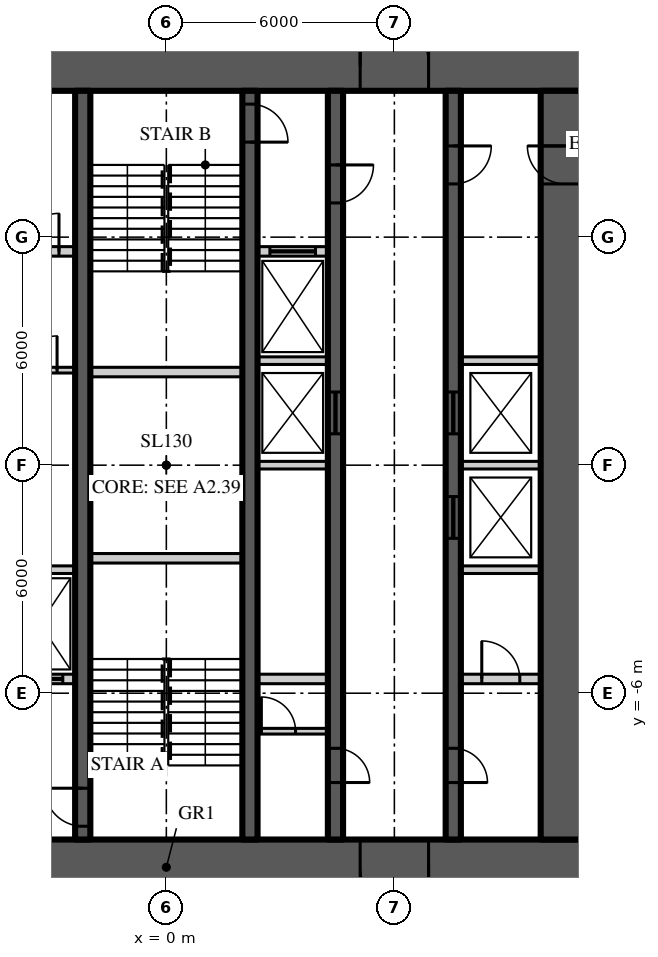
"""IFC4 building model, lengths in metres.
Left out: names, types, materials, properties, quantities, classifications, styles, units other than length and angle.
Written with IfcOpenShell. Run it as: python <this file> out.ifc"""

import sys

from ifc_helpers import new_model, si_unit, direction, frame, frame_2d, origin, place, context, subcontext, project, spatial, rectangle, extrude, element, fill, save


model = new_model("IFC4")
c1 = context("Model", 3, precision=1e-05, world=origin(), true_north=direction((0.0, 1.0)))
c2 = subcontext(c1, "Body", "Model", "MODEL_VIEW")
j1 = project(units=[si_unit("LENGTHUNIT", "METRE"), si_unit("PLANEANGLEUNIT", "RADIAN")], contexts=[c1])
p1 = place(None, origin())
s1 = spatial("IfcSite", under=j1, at=p1, CompositionType="ELEMENT")
p2 = place(p1, origin())
s2 = spatial("IfcBuilding", under=s1, at=p2, CompositionType="ELEMENT")
p3 = place(p2, frame((0.0, 0.0, 302.4)))
s3 = spatial("IfcBuildingStorey", under=s2, at=p3, CompositionType="ELEMENT", Elevation=302.4)
p4 = place(p3, frame((-11.15, 10.5, 0.0), z_axis=(0.0, 0.0, 1.0), x_axis=(1.0, 0.0, 0.0)))
e1 = element("IfcWall", 1, at=p4, inside=s3, PredefinedType="SHEAR", context=c2, shape_type="SweptSolid", body=[
    extrude(rectangle(XDim=22.3, YDim=1.3, at=frame_2d((11.15, 0.0))), origin(), (0.0, 0.0, 1.0), 3.9),
])
p5 = place(p4, frame((4.25, 0.0, 0.0)))
e2 = element("IfcOpeningElement", 2, at=p5, cuts=e1, PredefinedType="OPENING", context=c2, shape_type="SweptSolid", body=[
    extrude(rectangle(XDim=1.8, YDim=2.2, at=frame_2d((0.9, 1.1))), frame((0.0, 0.66, 0.0), z_axis=(0.0, -1.0, 0.0), x_axis=(1.0, 0.0, 0.0)), (0.0, 0.0, 1.0), 1.32),
])
p6 = place(p4, frame((16.25, 0.0, 0.0)))
e3 = element("IfcOpeningElement", 3, at=p6, cuts=e1, PredefinedType="OPENING", context=c2, shape_type="SweptSolid", body=[
    extrude(rectangle(XDim=1.8, YDim=2.2, at=frame_2d((0.9, 1.1))), frame((0.0, 0.66, 0.0), z_axis=(0.0, -1.0, 0.0), x_axis=(1.0, 0.0, 0.0)), (0.0, 0.0, 1.0), 1.32),
])
p7 = place(p3, frame((11.15, -10.5, 0.0), z_axis=(0.0, 0.0, 1.0), x_axis=(-1.0, 0.0, 0.0)))
e4 = element("IfcWall", 4, at=p7, inside=s3, PredefinedType="SHEAR", context=c2, shape_type="SweptSolid", body=[
    extrude(rectangle(XDim=22.3, YDim=1.3, at=frame_2d((11.15, 0.0))), origin(), (0.0, 0.0, 1.0), 3.9),
])
p8 = place(p7, frame((16.25, 0.0, 0.0)))
e5 = element("IfcOpeningElement", 5, at=p8, cuts=e4, PredefinedType="OPENING", context=c2, shape_type="SweptSolid", body=[
    extrude(rectangle(XDim=1.8, YDim=2.2, at=frame_2d((0.9, 1.1))), frame((0.0, 0.66, 0.0), z_axis=(0.0, -1.0, 0.0), x_axis=(1.0, 0.0, 0.0)), (0.0, 0.0, 1.0), 1.32),
])
p9 = place(p7, frame((4.25, 0.0, 0.0)))
e6 = element("IfcOpeningElement", 6, at=p9, cuts=e4, PredefinedType="OPENING", context=c2, shape_type="SweptSolid", body=[
    extrude(rectangle(XDim=1.8, YDim=2.2, at=frame_2d((0.9, 1.1))), frame((0.0, 0.66, 0.0), z_axis=(0.0, -1.0, 0.0), x_axis=(1.0, 0.0, 0.0)), (0.0, 0.0, 1.0), 1.32),
])
p10 = place(p3, frame((10.5, -9.85, 0.0), z_axis=(0.0, 0.0, 1.0), x_axis=(0.0, 1.0, 0.0)))
e7 = element("IfcWall", 7, at=p10, inside=s3, PredefinedType="SHEAR", context=c2, shape_type="SweptSolid", body=[
    extrude(rectangle(XDim=19.7, YDim=1.3, at=frame_2d((9.85, 0.0))), origin(), (0.0, 0.0, 1.0), 3.9),
])
p11 = place(p10, frame((17.25, 0.0, 0.0)))
e8 = element("IfcOpeningElement", 8, at=p11, cuts=e7, PredefinedType="OPENING", context=c2, shape_type="SweptSolid", body=[
    extrude(rectangle(XDim=1.0, YDim=2.2, at=frame_2d((0.5, 1.1))), frame((0.0, 0.66, 0.0), z_axis=(0.0, -1.0, 0.0), x_axis=(1.0, 0.0, 0.0)), (0.0, 0.0, 1.0), 1.32),
])
p12 = place(p3, frame((7.55, 9.85, 0.0), z_axis=(0.0, 0.0, 1.0), x_axis=(0.0, -1.0, 0.0)))
e9 = element("IfcWall", 9, at=p12, inside=s3, PredefinedType="SHEAR", context=c2, shape_type="SweptSolid", body=[
    extrude(rectangle(XDim=19.7, YDim=0.4, at=frame_2d((9.85, 0.0))), origin(), (0.0, 0.0, 1.0), 3.9),
])
p13 = place(p12, frame((1.45, 0.0, 0.0)))
e10 = element("IfcOpeningElement", 10, at=p13, cuts=e9, PredefinedType="OPENING", context=c2, shape_type="SweptSolid", body=[
    extrude(rectangle(XDim=1.0, YDim=2.2, at=frame_2d((0.5, 1.1))), frame((0.0, 0.21, 0.0), z_axis=(0.0, -1.0, 0.0), x_axis=(1.0, 0.0, 0.0)), (0.0, 0.0, 1.0), 0.42),
])
p14 = place(p12, frame((17.3, 0.0, 0.0)))
e11 = element("IfcOpeningElement", 11, at=p14, cuts=e9, PredefinedType="OPENING", context=c2, shape_type="SweptSolid", body=[
    extrude(rectangle(XDim=0.9, YDim=2.1, at=frame_2d((0.45, 1.05))), frame((0.0, 0.21, 0.0), z_axis=(0.0, -1.0, 0.0), x_axis=(1.0, 0.0, 0.0)), (0.0, 0.0, 1.0), 0.42),
])
p15 = place(p12, frame((7.925, 0.0, 0.0)))
e12 = element("IfcOpeningElement", 12, at=p15, cuts=e9, PredefinedType="OPENING", context=c2, shape_type="SweptSolid", body=[
    extrude(rectangle(XDim=1.1, YDim=2.2, at=frame_2d((0.55, 1.1))), frame((0.0, 0.21, 0.0), z_axis=(0.0, -1.0, 0.0), x_axis=(1.0, 0.0, 0.0)), (0.0, 0.0, 1.0), 0.42),
])
p16 = place(p12, frame((10.675, 0.0, 0.0)))
e13 = element("IfcOpeningElement", 13, at=p16, cuts=e9, PredefinedType="OPENING", context=c2, shape_type="SweptSolid", body=[
    extrude(rectangle(XDim=1.1, YDim=2.2, at=frame_2d((0.55, 1.1))), frame((0.0, 0.21, 0.0), z_axis=(0.0, -1.0, 0.0), x_axis=(1.0, 0.0, 0.0)), (0.0, 0.0, 1.0), 0.42),
])
p17 = place(p3, frame((4.45, 9.85, 0.0), z_axis=(0.0, 0.0, 1.0), x_axis=(0.0, -1.0, 0.0)))
e14 = element("IfcWall", 14, at=p17, inside=s3, PredefinedType="SHEAR", context=c2, shape_type="SweptSolid", body=[
    extrude(rectangle(XDim=19.7, YDim=0.4, at=frame_2d((9.85, 0.0))), origin(), (0.0, 0.0, 1.0), 3.9),
])
p18 = place(p17, frame((1.95, 0.0, 0.0)))
e15 = element("IfcOpeningElement", 15, at=p18, cuts=e14, PredefinedType="OPENING", context=c2, shape_type="SweptSolid", body=[
    extrude(rectangle(XDim=1.0, YDim=2.2, at=frame_2d((0.5, 1.1))), frame((0.0, 0.21, 0.0), z_axis=(0.0, -1.0, 0.0), x_axis=(1.0, 0.0, 0.0)), (0.0, 0.0, 1.0), 0.42),
])
p19 = place(p17, frame((17.3, 0.0, 0.0)))
e16 = element("IfcOpeningElement", 16, at=p19, cuts=e14, PredefinedType="OPENING", context=c2, shape_type="SweptSolid", body=[
    extrude(rectangle(XDim=0.9, YDim=2.1, at=frame_2d((0.45, 1.05))), frame((0.0, 0.21, 0.0), z_axis=(0.0, -1.0, 0.0), x_axis=(1.0, 0.0, 0.0)), (0.0, 0.0, 1.0), 0.42),
])
p20 = place(p17, frame((7.925, 0.0, 0.0)))
e17 = element("IfcOpeningElement", 17, at=p20, cuts=e14, PredefinedType="OPENING", context=c2, shape_type="SweptSolid", body=[
    extrude(rectangle(XDim=1.1, YDim=2.2, at=frame_2d((0.55, 1.1))), frame((0.0, 0.21, 0.0), z_axis=(0.0, -1.0, 0.0), x_axis=(1.0, 0.0, 0.0)), (0.0, 0.0, 1.0), 0.42),
])
p21 = place(p3, frame((-2.2, -9.85, 0.0), z_axis=(0.0, 0.0, 1.0), x_axis=(0.0, 1.0, 0.0)))
e18 = element("IfcWall", 18, at=p21, inside=s3, PredefinedType="SHEAR", context=c2, shape_type="SweptSolid", body=[
    extrude(rectangle(XDim=19.7, YDim=0.4, at=frame_2d((9.85, 0.0))), origin(), (0.0, 0.0, 1.0), 3.9),
])
p22 = place(p21, frame((0.35, 0.0, 0.0)))
e19 = element("IfcOpeningElement", 19, at=p22, cuts=e18, PredefinedType="OPENING", context=c2, shape_type="SweptSolid", body=[
    extrude(rectangle(XDim=1.0, YDim=2.2, at=frame_2d((0.5, 1.1))), frame((0.0, 0.21, 0.0), z_axis=(0.0, -1.0, 0.0), x_axis=(1.0, 0.0, 0.0)), (0.0, 0.0, 1.0), 0.42),
])
p23 = place(p3, frame((2.2, 9.85, 0.0), z_axis=(0.0, 0.0, 1.0), x_axis=(0.0, -1.0, 0.0)))
e20 = element("IfcWall", 20, at=p23, inside=s3, PredefinedType="SHEAR", context=c2, shape_type="SweptSolid", body=[
    extrude(rectangle(XDim=19.7, YDim=0.4, at=frame_2d((9.85, 0.0))), origin(), (0.0, 0.0, 1.0), 3.9),
])
p24 = place(p23, frame((0.35, 0.0, 0.0)))
e21 = element("IfcOpeningElement", 21, at=p24, cuts=e20, PredefinedType="OPENING", context=c2, shape_type="SweptSolid", body=[
    extrude(rectangle(XDim=1.0, YDim=2.2, at=frame_2d((0.5, 1.1))), frame((0.0, 0.21, 0.0), z_axis=(0.0, -1.0, 0.0), x_axis=(1.0, 0.0, 0.0)), (0.0, 0.0, 1.0), 0.42),
])
p25 = place(p3, frame((-4.25, 5.625, 0.0), z_axis=(0.0, 0.0, 1.0), x_axis=(1.0, 0.0, 0.0)))
e22 = element("IfcWall", 22, at=p25, inside=s3, PredefinedType="SOLIDWALL", context=c2, shape_type="SweptSolid", body=[
    extrude(rectangle(XDim=1.85, YDim=0.25, at=frame_2d((0.925, 0.0))), origin(), (0.0, 0.0, 1.0), 3.7),
])
p26 = place(p25, frame((0.425, 0.0, 0.0)))
e23 = element("IfcOpeningElement", 23, at=p26, cuts=e22, PredefinedType="OPENING", context=c2, shape_type="SweptSolid", body=[
    extrude(rectangle(XDim=1.0, YDim=2.2, at=frame_2d((0.5, 1.1))), frame((0.0, 0.135, 0.0), z_axis=(0.0, -1.0, 0.0), x_axis=(1.0, 0.0, 0.0)), (0.0, 0.0, 1.0), 0.27),
])
p27 = place(p3, frame((2.4, 5.625, 0.0), z_axis=(0.0, 0.0, 1.0), x_axis=(1.0, 0.0, 0.0)))
e24 = element("IfcWall", 24, at=p27, inside=s3, PredefinedType="SOLIDWALL", context=c2, shape_type="SweptSolid", body=[
    extrude(rectangle(XDim=1.85, YDim=0.25, at=frame_2d((0.925, 0.0))), origin(), (0.0, 0.0, 1.0), 3.7),
])
p28 = place(p27, frame((0.325, 0.0, 0.0)))
e25 = element("IfcOpeningElement", 25, at=p28, cuts=e24, PredefinedType="OPENING", context=c2, shape_type="SweptSolid", body=[
    extrude(rectangle(XDim=1.2, YDim=2.2, at=frame_2d((0.6, 1.1))), frame((0.0, 0.135, 0.0), z_axis=(0.0, -1.0, 0.0), x_axis=(1.0, 0.0, 0.0)), (0.0, 0.0, 1.0), 0.27),
])
p29 = place(p3, frame((-4.25, -5.625, 0.0), z_axis=(0.0, 0.0, 1.0), x_axis=(1.0, 0.0, 0.0)))
e26 = element("IfcWall", 26, at=p29, inside=s3, PredefinedType="SOLIDWALL", context=c2, shape_type="SweptSolid", body=[
    extrude(rectangle(XDim=1.85, YDim=0.25, at=frame_2d((0.925, 0.0))), origin(), (0.0, 0.0, 1.0), 3.7),
])
p30 = place(p29, frame((0.325, 0.0, 0.0)))
e27 = element("IfcOpeningElement", 27, at=p30, cuts=e26, PredefinedType="OPENING", context=c2, shape_type="SweptSolid", body=[
    extrude(rectangle(XDim=1.2, YDim=2.2, at=frame_2d((0.6, 1.1))), frame((0.0, 0.135, 0.0), z_axis=(0.0, -1.0, 0.0), x_axis=(1.0, 0.0, 0.0)), (0.0, 0.0, 1.0), 0.27),
])
p31 = place(p3, frame((2.4, -5.625, 0.0), z_axis=(0.0, 0.0, 1.0), x_axis=(1.0, 0.0, 0.0)))
e28 = element("IfcWall", 28, at=p31, inside=s3, PredefinedType="SOLIDWALL", context=c2, shape_type="SweptSolid", body=[
    extrude(rectangle(XDim=1.85, YDim=0.25, at=frame_2d((0.925, 0.0))), origin(), (0.0, 0.0, 1.0), 3.7),
])
p32 = place(p3, frame((7.75, -5.625, 0.0), z_axis=(0.0, 0.0, 1.0), x_axis=(1.0, 0.0, 0.0)))
e29 = element("IfcWall", 29, at=p32, inside=s3, PredefinedType="SOLIDWALL", context=c2, shape_type="SweptSolid", body=[
    extrude(rectangle(XDim=2.1, YDim=0.25, at=frame_2d((1.05, 0.0))), origin(), (0.0, 0.0, 1.0), 3.7),
])
p33 = place(p32, frame((0.55, 0.0, 0.0)))
e30 = element("IfcOpeningElement", 30, at=p33, cuts=e29, PredefinedType="OPENING", context=c2, shape_type="SweptSolid", body=[
    extrude(rectangle(XDim=1.0, YDim=2.2, at=frame_2d((0.5, 1.1))), frame((0.0, 0.135, 0.0), z_axis=(0.0, -1.0, 0.0), x_axis=(1.0, 0.0, 0.0)), (0.0, 0.0, 1.0), 0.27),
])
for number, where, z_axis, x_axis in (
    (31, (-2.0, -2.45, 0.0), (0.0, 0.0, 1.0), (1.0, 0.0, 0.0)),
    (32, (-2.0, 2.45, 0.0), (0.0, 0.0, 1.0), (1.0, 0.0, 0.0)),
):
    element("IfcWall", number, at=place(p3, frame(where, z_axis=z_axis, x_axis=x_axis)), inside=s3, PredefinedType="SOLIDWALL", context=c2, shape_type="SweptSolid", body=[
        extrude(rectangle(XDim=4.0, YDim=0.25, at=frame_2d((2.0, 0.0))), origin(), (0.0, 0.0, 1.0), 3.7),
    ])
p34 = place(p3, frame((-4.25, -2.75, 0.0), z_axis=(0.0, 0.0, 1.0), x_axis=(1.0, 0.0, 0.0)))
e33 = element("IfcWall", 33, at=p34, inside=s3, PredefinedType="SOLIDWALL", context=c2, shape_type="SweptSolid", body=[
    extrude(rectangle(XDim=1.85, YDim=0.2, at=frame_2d((0.925, 0.0))), origin(), (0.0, 0.0, 1.0), 3.7),
])
p35 = place(p3, frame((7.75, -2.75, 0.0), z_axis=(0.0, 0.0, 1.0), x_axis=(1.0, 0.0, 0.0)))
e34 = element("IfcWall", 34, at=p35, inside=s3, PredefinedType="SOLIDWALL", context=c2, shape_type="SweptSolid", body=[
    extrude(rectangle(XDim=2.1, YDim=0.2, at=frame_2d((1.05, 0.0))), origin(), (0.0, 0.0, 1.0), 3.7),
])
p36 = place(p3, frame((2.4, 0.0, 0.0), z_axis=(0.0, 0.0, 1.0), x_axis=(1.0, 0.0, 0.0)))
e35 = element("IfcWall", 35, at=p36, inside=s3, PredefinedType="SOLIDWALL", context=c2, shape_type="SweptSolid", body=[
    extrude(rectangle(XDim=1.85, YDim=0.2, at=frame_2d((0.925, 0.0))), origin(), (0.0, 0.0, 1.0), 3.7),
])
p37 = place(p3, frame((7.75, 0.0, 0.0), z_axis=(0.0, 0.0, 1.0), x_axis=(1.0, 0.0, 0.0)))
e36 = element("IfcWall", 36, at=p37, inside=s3, PredefinedType="SOLIDWALL", context=c2, shape_type="SweptSolid", body=[
    extrude(rectangle(XDim=2.1, YDim=0.2, at=frame_2d((1.05, 0.0))), origin(), (0.0, 0.0, 1.0), 3.7),
])
p38 = place(p3, frame((2.4, 2.75, 0.0), z_axis=(0.0, 0.0, 1.0), x_axis=(1.0, 0.0, 0.0)))
e37 = element("IfcWall", 37, at=p38, inside=s3, PredefinedType="SOLIDWALL", context=c2, shape_type="SweptSolid", body=[
    extrude(rectangle(XDim=1.85, YDim=0.2, at=frame_2d((0.925, 0.0))), origin(), (0.0, 0.0, 1.0), 3.7),
])
p39 = place(p3, frame((7.75, 2.75, 0.0), z_axis=(0.0, 0.0, 1.0), x_axis=(1.0, 0.0, 0.0)))
e38 = element("IfcWall", 38, at=p39, inside=s3, PredefinedType="SOLIDWALL", context=c2, shape_type="SweptSolid", body=[
    extrude(rectangle(XDim=2.1, YDim=0.2, at=frame_2d((1.05, 0.0))), origin(), (0.0, 0.0, 1.0), 3.7),
])
p40 = place(p3, frame((-4.25, 2.5, 0.0), z_axis=(0.0, 0.0, 1.0), x_axis=(1.0, 0.0, 0.0)))
e39 = element("IfcWall", 39, at=p40, inside=s3, PredefinedType="SOLIDWALL", context=c2, shape_type="SweptSolid", body=[
    extrude(rectangle(XDim=1.85, YDim=0.15, at=frame_2d((0.925, 0.0))), origin(), (0.0, 0.0, 1.0), 3.72),
])
p41 = place(p40, frame((0.475, 0.0, 0.0)))
e40 = element("IfcOpeningElement", 40, at=p41, cuts=e39, PredefinedType="OPENING", context=c2, shape_type="SweptSolid", body=[
    extrude(rectangle(XDim=0.9, YDim=2.1, at=frame_2d((0.45, 1.05))), frame((0.0, 0.085, 0.0), z_axis=(0.0, -1.0, 0.0), x_axis=(1.0, 0.0, 0.0)), (0.0, 0.0, 1.0), 0.17),
])
p42 = place(p3, frame((2.4, -7.0, 0.0), z_axis=(0.0, 0.0, 1.0), x_axis=(1.0, 0.0, 0.0)))
e41 = element("IfcWall", 41, at=p42, inside=s3, PredefinedType="SOLIDWALL", context=c2, shape_type="SweptSolid", body=[
    extrude(rectangle(XDim=1.85, YDim=0.15, at=frame_2d((0.925, 0.0))), origin(), (0.0, 0.0, 1.0), 3.72),
])
p43 = place(p42, frame((0.1, 0.0, 0.0)))
e42 = element("IfcOpeningElement", 42, at=p43, cuts=e41, PredefinedType="OPENING", context=c2, shape_type="SweptSolid", body=[
    extrude(rectangle(XDim=0.9, YDim=2.1, at=frame_2d((0.45, 1.05))), frame((0.0, 0.085, 0.0), z_axis=(0.0, -1.0, 0.0), x_axis=(1.0, 0.0, 0.0)), (0.0, 0.0, 1.0), 0.17),
])
p44 = place(p6, origin())
e43 = element("IfcDoor", 43, at=p44, inside=s3, OperationType="DOUBLE_DOOR_DOUBLE_SWING", PredefinedType="DOOR", context=c2, shape_type="SweptSolid", body=[
    extrude(rectangle(XDim=1.8, YDim=2.2, at=frame_2d((0.9, 1.1))), frame((0.0, 0.025, 0.0), z_axis=(0.0, -1.0, 0.0), x_axis=(1.0, 0.0, 0.0)), (0.0, 0.0, 1.0), 0.05),
])
fill(e3, e43)
p45 = place(p9, origin())
e44 = element("IfcDoor", 44, at=p45, inside=s3, OperationType="DOUBLE_DOOR_DOUBLE_SWING", PredefinedType="DOOR", context=c2, shape_type="SweptSolid", body=[
    extrude(rectangle(XDim=1.8, YDim=2.2, at=frame_2d((0.9, 1.1))), frame((0.0, 0.025, 0.0), z_axis=(0.0, -1.0, 0.0), x_axis=(1.0, 0.0, 0.0)), (0.0, 0.0, 1.0), 0.05),
])
fill(e6, e44)
p46 = place(p13, origin())
e45 = element("IfcDoor", 45, at=p46, inside=s3, OperationType="SINGLE_SWING_LEFT", PredefinedType="DOOR", context=c2, shape_type="SweptSolid", body=[
    extrude(rectangle(XDim=1.0, YDim=2.2, at=frame_2d((0.5, 1.1))), frame((0.0, 0.025, 0.0), z_axis=(0.0, -1.0, 0.0), x_axis=(1.0, 0.0, 0.0)), (0.0, 0.0, 1.0), 0.05),
])
fill(e10, e45)
p47 = place(p11, origin())
e46 = element("IfcDoor", 46, at=p47, inside=s3, OperationType="SINGLE_SWING_RIGHT", PredefinedType="DOOR", context=c2, shape_type="SweptSolid", body=[
    extrude(rectangle(XDim=1.0, YDim=2.2, at=frame_2d((0.5, 1.1))), frame((0.0, 0.025, 0.0), z_axis=(0.0, -1.0, 0.0), x_axis=(1.0, 0.0, 0.0)), (0.0, 0.0, 1.0), 0.05),
])
fill(e8, e46)
p48 = place(p22, origin())
e47 = element("IfcDoor", 47, at=p48, inside=s3, OperationType="SINGLE_SWING_RIGHT", PredefinedType="DOOR", context=c2, shape_type="SweptSolid", body=[
    extrude(rectangle(XDim=1.0, YDim=2.2, at=frame_2d((0.5, 1.1))), frame((0.0, 0.025, 0.0), z_axis=(0.0, -1.0, 0.0), x_axis=(1.0, 0.0, 0.0)), (0.0, 0.0, 1.0), 0.05),
])
fill(e19, e47)
p49 = place(p18, origin())
e48 = element("IfcDoor", 48, at=p49, inside=s3, OperationType="SINGLE_SWING_LEFT", PredefinedType="DOOR", context=c2, shape_type="SweptSolid", body=[
    extrude(rectangle(XDim=1.0, YDim=2.2, at=frame_2d((0.5, 1.1))), frame((0.0, 0.025, 0.0), z_axis=(0.0, -1.0, 0.0), x_axis=(1.0, 0.0, 0.0)), (0.0, 0.0, 1.0), 0.05),
])
fill(e15, e48)
p50 = place(p24, origin())
e49 = element("IfcDoor", 49, at=p50, inside=s3, OperationType="SINGLE_SWING_RIGHT", PredefinedType="DOOR", context=c2, shape_type="SweptSolid", body=[
    extrude(rectangle(XDim=1.0, YDim=2.2, at=frame_2d((0.5, 1.1))), frame((0.0, 0.025, 0.0), z_axis=(0.0, -1.0, 0.0), x_axis=(1.0, 0.0, 0.0)), (0.0, 0.0, 1.0), 0.05),
])
fill(e21, e49)
p51 = place(p14, origin())
e50 = element("IfcDoor", 50, at=p51, inside=s3, OperationType="SINGLE_SWING_RIGHT", PredefinedType="DOOR", context=c2, shape_type="SweptSolid", body=[
    extrude(rectangle(XDim=0.9, YDim=2.1, at=frame_2d((0.45, 1.05))), frame((0.0, 0.025, 0.0), z_axis=(0.0, -1.0, 0.0), x_axis=(1.0, 0.0, 0.0)), (0.0, 0.0, 1.0), 0.05),
])
fill(e11, e50)
p52 = place(p19, origin())
e51 = element("IfcDoor", 51, at=p52, inside=s3, OperationType="SINGLE_SWING_RIGHT", PredefinedType="DOOR", context=c2, shape_type="SweptSolid", body=[
    extrude(rectangle(XDim=0.9, YDim=2.1, at=frame_2d((0.45, 1.05))), frame((0.0, 0.025, 0.0), z_axis=(0.0, -1.0, 0.0), x_axis=(1.0, 0.0, 0.0)), (0.0, 0.0, 1.0), 0.05),
])
fill(e16, e51)
p53 = place(p15, origin())
e52 = element("IfcDoor", 52, at=p53, inside=s3, OperationType="SLIDING_TO_LEFT", PredefinedType="DOOR", context=c2, shape_type="SweptSolid", body=[
    extrude(rectangle(XDim=1.1, YDim=2.2, at=frame_2d((0.55, 1.1))), frame((0.0, 0.025, 0.0), z_axis=(0.0, -1.0, 0.0), x_axis=(1.0, 0.0, 0.0)), (0.0, 0.0, 1.0), 0.05),
])
fill(e12, e52)
p54 = place(p16, origin())
e53 = element("IfcDoor", 53, at=p54, inside=s3, OperationType="SLIDING_TO_LEFT", PredefinedType="DOOR", context=c2, shape_type="SweptSolid", body=[
    extrude(rectangle(XDim=1.1, YDim=2.2, at=frame_2d((0.55, 1.1))), frame((0.0, 0.025, 0.0), z_axis=(0.0, -1.0, 0.0), x_axis=(1.0, 0.0, 0.0)), (0.0, 0.0, 1.0), 0.05),
])
fill(e13, e53)
p55 = place(p20, origin())
e54 = element("IfcDoor", 54, at=p55, inside=s3, OperationType="SLIDING_TO_LEFT", PredefinedType="DOOR", context=c2, shape_type="SweptSolid", body=[
    extrude(rectangle(XDim=1.1, YDim=2.2, at=frame_2d((0.55, 1.1))), frame((0.0, 0.025, 0.0), z_axis=(0.0, -1.0, 0.0), x_axis=(1.0, 0.0, 0.0)), (0.0, 0.0, 1.0), 0.05),
])
fill(e17, e54)
p56 = place(p30, origin())
e55 = element("IfcDoor", 55, at=p56, inside=s3, OperationType="SLIDING_TO_LEFT", PredefinedType="DOOR", context=c2, shape_type="SweptSolid", body=[
    extrude(rectangle(XDim=1.2, YDim=2.2, at=frame_2d((0.6, 1.1))), frame((0.0, 0.025, 0.0), z_axis=(0.0, -1.0, 0.0), x_axis=(1.0, 0.0, 0.0)), (0.0, 0.0, 1.0), 0.05),
])
fill(e27, e55)
p57 = place(p28, origin())
e56 = element("IfcDoor", 56, at=p57, inside=s3, OperationType="SLIDING_TO_LEFT", PredefinedType="DOOR", context=c2, shape_type="SweptSolid", body=[
    extrude(rectangle(XDim=1.2, YDim=2.2, at=frame_2d((0.6, 1.1))), frame((0.0, 0.025, 0.0), z_axis=(0.0, -1.0, 0.0), x_axis=(1.0, 0.0, 0.0)), (0.0, 0.0, 1.0), 0.05),
])
fill(e25, e56)
p58 = place(p41, origin())
e57 = element("IfcDoor", 57, at=p58, inside=s3, OperationType="SINGLE_SWING_RIGHT", PredefinedType="DOOR", context=c2, shape_type="SweptSolid", body=[
    extrude(rectangle(XDim=0.9, YDim=2.1, at=frame_2d((0.45, 1.05))), frame((0.0, 0.025, 0.0), z_axis=(0.0, -1.0, 0.0), x_axis=(1.0, 0.0, 0.0)), (0.0, 0.0, 1.0), 0.05),
])
fill(e40, e57)
p59 = place(p26, origin())
e58 = element("IfcDoor", 58, at=p59, inside=s3, OperationType="SINGLE_SWING_RIGHT", PredefinedType="DOOR", context=c2, shape_type="SweptSolid", body=[
    extrude(rectangle(XDim=1.0, YDim=2.2, at=frame_2d((0.5, 1.1))), frame((0.0, 0.025, 0.0), z_axis=(0.0, -1.0, 0.0), x_axis=(1.0, 0.0, 0.0)), (0.0, 0.0, 1.0), 0.05),
])
fill(e23, e58)
p60 = place(p33, origin())
e59 = element("IfcDoor", 59, at=p60, inside=s3, OperationType="SINGLE_SWING_LEFT", PredefinedType="DOOR", context=c2, shape_type="SweptSolid", body=[
    extrude(rectangle(XDim=1.0, YDim=2.2, at=frame_2d((0.5, 1.1))), frame((0.0, 0.025, 0.0), z_axis=(0.0, -1.0, 0.0), x_axis=(1.0, 0.0, 0.0)), (0.0, 0.0, 1.0), 0.05),
])
fill(e30, e59)
p61 = place(p43, origin())
e60 = element("IfcDoor", 60, at=p61, inside=s3, OperationType="SINGLE_SWING_LEFT", PredefinedType="DOOR", context=c2, shape_type="SweptSolid", body=[
    extrude(rectangle(XDim=0.9, YDim=2.1, at=frame_2d((0.45, 1.05))), frame((0.0, 0.025, 0.0), z_axis=(0.0, -1.0, 0.0), x_axis=(1.0, 0.0, 0.0)), (0.0, 0.0, 1.0), 0.05),
])
fill(e42, e60)
save(model, sys.argv[1])
